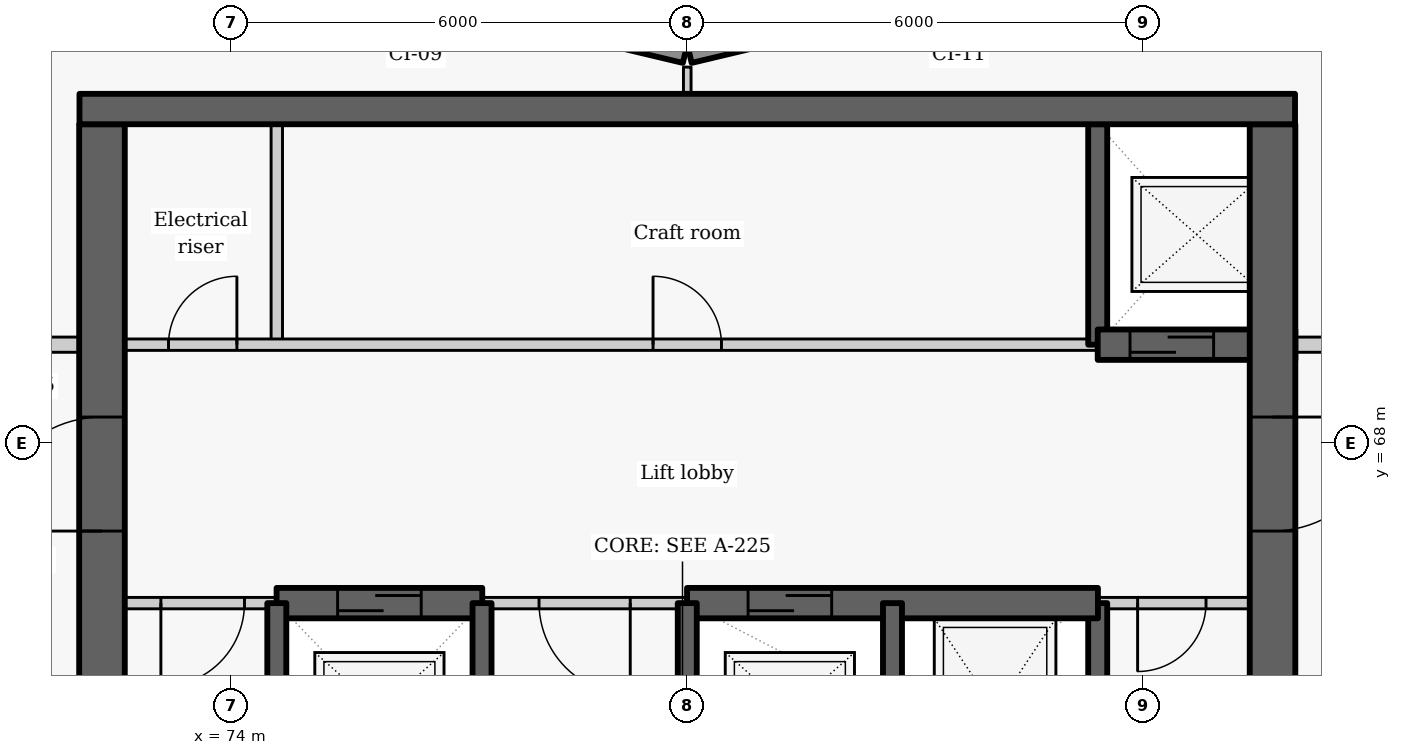
"""IFC4 building model, lengths in metres.
Left out: names, types, materials, properties, quantities, classifications, styles, units other than length and angle.
Written with IfcOpenShell. Run it as: python <this file> out.ifc"""

import sys

from ifc_helpers import new_model, si_unit, direction, frame, frame_2d, origin, place, context, subcontext, project, spatial, rectangle, extrude, element, fill, save


model = new_model("IFC4")
c1 = context("Model", 3, precision=1e-05, world=origin(), true_north=direction((0.0, 1.0)))
c2 = subcontext(c1, "Body", "Model", "MODEL_VIEW")
j1 = project(units=[si_unit("LENGTHUNIT", "METRE"), si_unit("PLANEANGLEUNIT", "RADIAN")], contexts=[c1])
p1 = place(None, origin())
s1 = spatial("IfcSite", under=j1, at=p1, CompositionType="ELEMENT")
p2 = place(p1, origin())
s2 = spatial("IfcBuilding", under=s1, at=p2, CompositionType="ELEMENT")
p3 = place(p2, frame((0.0, 0.0, 130.5)))
s3 = spatial("IfcBuildingStorey", under=s2, at=p3, CompositionType="ELEMENT", Elevation=130.5)
p4 = place(p3, frame((83.186, 73.881, 0.0), z_axis=(0.0, 0.0, 1.0), x_axis=(-0.972773113459, -0.231759508395, 0.0)))
e1 = element("IfcWall", 1, at=p4, inside=s3, PredefinedType="SOLIDWALL", context=c2, shape_type="SweptSolid", body=[
    extrude(rectangle(XDim=3.246, YDim=0.25, at=frame_2d((1.623, 0.0))), origin(), (0.0, 0.0, 1.0), 2.425),
])
p5 = place(p4, frame((0.573, 0.0, 0.9)))
e2 = element("IfcOpeningElement", 2, at=p5, cuts=e1, PredefinedType="OPENING", context=c2, shape_type="SweptSolid", body=[
    extrude(rectangle(XDim=2.1, YDim=1.1, at=frame_2d((1.05, 0.55))), frame((0.0, 0.135, 0.0), z_axis=(0.0, -1.0, 0.0), x_axis=(1.0, 0.0, 0.0)), (0.0, 0.0, 1.0), 0.27),
])
p6 = place(p3, frame((79.971, 73.128, 0.0), z_axis=(0.0, 0.0, 1.0), x_axis=(-0.972773113459, 0.231759508395, 0.0)))
e3 = element("IfcWall", 3, at=p6, inside=s3, PredefinedType="SOLIDWALL", context=c2, shape_type="SweptSolid", body=[
    extrude(rectangle(XDim=3.246, YDim=0.25, at=frame_2d((1.623, 0.0))), origin(), (0.0, 0.0, 1.0), 2.425),
])
p7 = place(p6, frame((0.573, 0.0, 0.9)))
e4 = element("IfcOpeningElement", 4, at=p7, cuts=e3, PredefinedType="OPENING", context=c2, shape_type="SweptSolid", body=[
    extrude(rectangle(XDim=2.1, YDim=1.1, at=frame_2d((1.05, 0.55))), frame((0.0, 0.135, 0.0), z_axis=(0.0, -1.0, 0.0), x_axis=(1.0, 0.0, 0.0)), (0.0, 0.0, 1.0), 0.27),
])
p8 = place(p3, frame((74.6, 69.3, 0.0), z_axis=(0.0, 0.0, 1.0), x_axis=(0.0, 1.0, 0.0)))
e5 = element("IfcWall", 5, at=p8, inside=s3, PredefinedType="PARTITIONING", context=c2, shape_type="SweptSolid", body=[
    extrude(rectangle(XDim=2.9, YDim=0.15, at=frame_2d((1.45, 0.0))), origin(), (0.0, 0.0, 1.0), 3.025),
])
p9 = place(p3, frame((72.0, 69.3, 0.0), z_axis=(0.0, 0.0, 1.0), x_axis=(1.0, 0.0, 0.0)))
e6 = element("IfcWall", 6, at=p9, inside=s3, PredefinedType="PARTITIONING", context=c2, shape_type="SweptSolid", body=[
    extrude(rectangle(XDim=13.4, YDim=0.15, at=frame_2d((6.7, 0.0))), origin(), (0.0, 0.0, 1.0), 3.025),
])
p10 = place(p9, frame((1.175, 0.0, 0.0)))
e7 = element("IfcOpeningElement", 7, at=p10, cuts=e6, PredefinedType="OPENING", context=c2, shape_type="SweptSolid", body=[
    extrude(rectangle(XDim=0.9, YDim=2.1, at=frame_2d((0.45, 1.05))), frame((0.0, 0.085, 0.0), z_axis=(0.0, -1.0, 0.0), x_axis=(1.0, 0.0, 0.0)), (0.0, 0.0, 1.0), 0.17),
])
p11 = place(p9, frame((7.55, 0.0, 0.0)))
e8 = element("IfcOpeningElement", 8, at=p11, cuts=e6, PredefinedType="OPENING", context=c2, shape_type="SweptSolid", body=[
    extrude(rectangle(XDim=0.9, YDim=2.1, at=frame_2d((0.45, 1.05))), frame((0.0, 0.085, 0.0), z_axis=(0.0, -1.0, 0.0), x_axis=(1.0, 0.0, 0.0)), (0.0, 0.0, 1.0), 0.17),
])
p12 = place(p3, frame((72.3, 63.1, -0.275), z_axis=(0.0, 0.0, 1.0), x_axis=(0.0, 1.0, 0.0)))
e9 = element("IfcWall", 9, at=p12, inside=s3, PredefinedType="SHEAR", context=c2, shape_type="SweptSolid", body=[
    extrude(rectangle(XDim=9.1, YDim=0.6, at=frame_2d((4.55, 0.0))), origin(), (0.0, 0.0, 1.0), 3.3),
])
p13 = place(p12, frame((3.748, 0.0, 0.275)))
e10 = element("IfcOpeningElement", 10, at=p13, cuts=e9, PredefinedType="OPENING", context=c2, shape_type="SweptSolid", body=[
    extrude(rectangle(XDim=1.5, YDim=2.1, at=frame_2d((0.75, 1.05))), frame((0.0, 0.31, 0.0), z_axis=(0.0, -1.0, 0.0), x_axis=(1.0, 0.0, 0.0)), (0.0, 0.0, 1.0), 0.62),
])
p14 = place(p3, frame((85.4, 63.1, -0.275), z_axis=(0.0, 0.0, 1.0), x_axis=(0.0, 1.0, 0.0)))
e11 = element("IfcWall", 11, at=p14, inside=s3, PredefinedType="SHEAR", context=c2, shape_type="SweptSolid", body=[
    extrude(rectangle(XDim=2.8, YDim=0.25, at=frame_2d((1.4, 0.0))), origin(), (0.0, 0.0, 1.0), 3.3),
])
p15 = place(p3, frame((85.4, 69.3, -0.275), z_axis=(0.0, 0.0, 1.0), x_axis=(0.0, 1.0, 0.0)))
e12 = element("IfcWall", 12, at=p15, inside=s3, PredefinedType="SHEAR", context=c2, shape_type="SweptSolid", body=[
    extrude(rectangle(XDim=2.9, YDim=0.25, at=frame_2d((1.45, 0.0))), origin(), (0.0, 0.0, 1.0), 3.3),
])
p16 = place(p3, frame((85.4, 69.3, -0.275), z_axis=(0.0, 0.0, 1.0), x_axis=(1.0, 0.0, 0.0)))
e13 = element("IfcWall", 13, at=p16, inside=s3, PredefinedType="SHEAR", context=c2, shape_type="SweptSolid", body=[
    extrude(rectangle(XDim=2.6, YDim=0.4, at=frame_2d((1.3, 0.0))), origin(), (0.0, 0.0, 1.0), 3.3),
])
p17 = place(p16, frame((0.425, 0.0, 0.275)))
e14 = element("IfcOpeningElement", 14, at=p17, cuts=e13, PredefinedType="OPENING", context=c2, shape_type="SweptSolid", body=[
    extrude(rectangle(XDim=1.1, YDim=2.1, at=frame_2d((0.55, 1.05))), frame((0.0, 0.21, 0.0), z_axis=(0.0, -1.0, 0.0), x_axis=(1.0, 0.0, 0.0)), (0.0, 0.0, 1.0), 0.42),
])
p18 = place(p3, frame((87.7, 72.2, -0.275), z_axis=(0.0, 0.0, 1.0), x_axis=(0.0, -1.0, 0.0)))
e15 = element("IfcWall", 15, at=p18, inside=s3, PredefinedType="SHEAR", context=c2, shape_type="SweptSolid", body=[
    extrude(rectangle(XDim=15.6, YDim=0.6, at=frame_2d((7.8, 0.0))), origin(), (0.0, 0.0, 1.0), 3.3),
])
p19 = place(p18, frame((3.852, 0.0, 0.275)))
e16 = element("IfcOpeningElement", 16, at=p19, cuts=e15, PredefinedType="OPENING", context=c2, shape_type="SweptSolid", body=[
    extrude(rectangle(XDim=1.5, YDim=2.1, at=frame_2d((0.75, 1.05))), frame((0.0, 0.31, 0.0), z_axis=(0.0, -1.0, 0.0), x_axis=(1.0, 0.0, 0.0)), (0.0, 0.0, 1.0), 0.62),
])
p20 = place(p3, frame((74.603, 65.9, 0.0), z_axis=(0.0, 0.0, 1.0), x_axis=(-1.0, 0.0, 0.0)))
e17 = element("IfcWall", 17, at=p20, inside=s3, PredefinedType="PARTITIONING", context=c2, shape_type="SweptSolid", body=[
    extrude(rectangle(XDim=2.603, YDim=0.15, at=frame_2d((1.302, 0.0))), origin(), (0.0, 0.0, 1.0), 3.025),
])
p21 = place(p20, frame((0.428, 0.0, 0.0)))
e18 = element("IfcOpeningElement", 18, at=p21, cuts=e17, PredefinedType="OPENING", context=c2, shape_type="SweptSolid", body=[
    extrude(rectangle(XDim=1.1, YDim=2.1, at=frame_2d((0.55, 1.05))), frame((0.0, 0.085, 0.0), z_axis=(0.0, -1.0, 0.0), x_axis=(1.0, 0.0, 0.0)), (0.0, 0.0, 1.0), 0.17),
])
p22 = place(p3, frame((80.003, 65.9, 0.0), z_axis=(0.0, 0.0, 1.0), x_axis=(-1.0, 0.0, 0.0)))
e19 = element("IfcWall", 19, at=p22, inside=s3, PredefinedType="PARTITIONING", context=c2, shape_type="SweptSolid", body=[
    extrude(rectangle(XDim=2.706, YDim=0.15, at=frame_2d((1.353, 0.0))), origin(), (0.0, 0.0, 1.0), 3.025),
])
p23 = place(p22, frame((0.753, 0.0, 0.0)))
e20 = element("IfcOpeningElement", 20, at=p23, cuts=e19, PredefinedType="OPENING", context=c2, shape_type="SweptSolid", body=[
    extrude(rectangle(XDim=1.2, YDim=2.1, at=frame_2d((0.6, 1.05))), frame((0.0, 0.085, 0.0), z_axis=(0.0, -1.0, 0.0), x_axis=(1.0, 0.0, 0.0)), (0.0, 0.0, 1.0), 0.17),
])
p24 = place(p3, frame((88.0, 65.9, 0.0), z_axis=(0.0, 0.0, 1.0), x_axis=(-1.0, 0.0, 0.0)))
e21 = element("IfcWall", 21, at=p24, inside=s3, PredefinedType="PARTITIONING", context=c2, shape_type="SweptSolid", body=[
    extrude(rectangle(XDim=2.603, YDim=0.15, at=frame_2d((1.302, 0.0))), origin(), (0.0, 0.0, 1.0), 3.025),
])
p25 = place(p24, frame((1.175, 0.0, 0.0)))
e22 = element("IfcOpeningElement", 22, at=p25, cuts=e21, PredefinedType="OPENING", context=c2, shape_type="SweptSolid", body=[
    extrude(rectangle(XDim=0.9, YDim=2.1, at=frame_2d((0.45, 1.05))), frame((0.0, 0.085, 0.0), z_axis=(0.0, -1.0, 0.0), x_axis=(1.0, 0.0, 0.0)), (0.0, 0.0, 1.0), 0.17),
])
p26 = place(p3, frame((74.597, 65.9, -0.275), z_axis=(0.0, 0.0, 1.0), x_axis=(1.0, 0.0, 0.0)))
e23 = element("IfcWall", 23, at=p26, inside=s3, PredefinedType="SHEAR", context=c2, shape_type="SweptSolid", body=[
    extrude(rectangle(XDim=2.706, YDim=0.4, at=frame_2d((1.353, 0.0))), origin(), (0.0, 0.0, 1.0), 3.3),
])
p27 = place(p26, frame((0.803, 0.0, 0.275)))
e24 = element("IfcOpeningElement", 24, at=p27, cuts=e23, PredefinedType="OPENING", context=c2, shape_type="SweptSolid", body=[
    extrude(rectangle(XDim=1.1, YDim=2.1, at=frame_2d((0.55, 1.05))), frame((0.0, 0.21, 0.0), z_axis=(0.0, -1.0, 0.0), x_axis=(1.0, 0.0, 0.0)), (0.0, 0.0, 1.0), 0.42),
])
p28 = place(p3, frame((79.997, 65.9, -0.275), z_axis=(0.0, 0.0, 1.0), x_axis=(1.0, 0.0, 0.0)))
e25 = element("IfcWall", 25, at=p28, inside=s3, PredefinedType="SHEAR", context=c2, shape_type="SweptSolid", body=[
    extrude(rectangle(XDim=5.406, YDim=0.4, at=frame_2d((2.703, 0.0))), origin(), (0.0, 0.0, 1.0), 3.3),
])
p29 = place(p28, frame((0.803, 0.0, 0.275)))
e26 = element("IfcOpeningElement", 26, at=p29, cuts=e25, PredefinedType="OPENING", context=c2, shape_type="SweptSolid", body=[
    extrude(rectangle(XDim=1.1, YDim=2.1, at=frame_2d((0.55, 1.05))), frame((0.0, 0.21, 0.0), z_axis=(0.0, -1.0, 0.0), x_axis=(1.0, 0.0, 0.0)), (0.0, 0.0, 1.0), 0.42),
])
for number, where, z_axis, x_axis in (
    (27, (74.6, 63.1, -0.275), (0.0, 0.0, 1.0), (0.0, 1.0, 0.0)),
    (28, (77.3, 63.1, -0.275), (0.0, 0.0, 1.0), (0.0, 1.0, 0.0)),
    (29, (80.0, 63.1, -0.275), (0.0, 0.0, 1.0), (0.0, 1.0, 0.0)),
    (30, (82.7, 63.1, -0.275), (0.0, 0.0, 1.0), (0.0, 1.0, 0.0)),
):
    element("IfcWall", number, at=place(p3, frame(where, z_axis=z_axis, x_axis=x_axis)), inside=s3, PredefinedType="SHEAR", context=c2, shape_type="SweptSolid", body=[
        extrude(rectangle(XDim=2.8, YDim=0.25, at=frame_2d((1.4, 0.0))), origin(), (0.0, 0.0, 1.0), 3.3),
    ])
for number, where, z_axis, x_axis in (
    (31, (70.45, 69.3, 0.0), (0.0, 0.0, 1.0), (1.0, 0.0, 0.0)),
    (32, (88.0, 69.3, 0.0), (0.0, 0.0, 1.0), (1.0, 0.0, 0.0)),
):
    element("IfcWall", number, at=place(p3, frame(where, z_axis=z_axis, x_axis=x_axis)), inside=s3, PredefinedType="PARTITIONING", context=c2, shape_type="SweptSolid", body=[
        extrude(rectangle(XDim=1.55, YDim=0.2, at=frame_2d((0.775, 0.0))), origin(), (0.0, 0.0, 1.0), 3.025),
    ])
p30 = place(p3, frame((80.0, 72.6, 0.0), z_axis=(0.0, 0.0, 1.0), x_axis=(0.0, 1.0, 0.0)))
e33 = element("IfcWall", 33, at=p30, inside=s3, PredefinedType="PARTITIONING", context=c2, shape_type="SweptSolid", body=[
    extrude(rectangle(XDim=0.352, YDim=0.1, at=frame_2d((0.176, 0.0))), origin(), (0.0, 0.0, 1.0), 3.025),
])
p31 = place(p3, frame((72.004, 72.4, -0.275), z_axis=(0.0, 0.0, 1.0), x_axis=(1.0, 0.0, 0.0)))
e34 = element("IfcWall", 34, at=p31, inside=s3, PredefinedType="SHEAR", context=c2, shape_type="SweptSolid", body=[
    extrude(rectangle(XDim=15.992, YDim=0.4, at=frame_2d((7.996, 0.0))), origin(), (0.0, 0.0, 1.0), 3.3),
])
p32 = place(p10, origin())
e35 = element("IfcDoor", 35, at=p32, inside=s3, OperationType="SINGLE_SWING_RIGHT", PredefinedType="DOOR", context=c2, shape_type="SweptSolid", body=[
    extrude(rectangle(XDim=0.9, YDim=2.1, at=frame_2d((0.45, 1.05))), frame((0.0, 0.025, 0.0), z_axis=(0.0, -1.0, 0.0), x_axis=(1.0, 0.0, 0.0)), (0.0, 0.0, 1.0), 0.05),
])
fill(e7, e35)
p33 = place(p17, origin())
e36 = element("IfcDoor", 36, at=p33, inside=s3, OperationType="SLIDING_TO_LEFT", PredefinedType="DOOR", context=c2, shape_type="SweptSolid", body=[
    extrude(rectangle(XDim=1.1, YDim=2.1, at=frame_2d((0.55, 1.05))), frame((0.0, 0.025, 0.0), z_axis=(0.0, -1.0, 0.0), x_axis=(1.0, 0.0, 0.0)), (0.0, 0.0, 1.0), 0.05),
])
fill(e14, e36)
p34 = place(p11, origin())
e37 = element("IfcDoor", 37, at=p34, inside=s3, OperationType="SINGLE_SWING_LEFT", PredefinedType="DOOR", context=c2, shape_type="SweptSolid", body=[
    extrude(rectangle(XDim=0.9, YDim=2.1, at=frame_2d((0.45, 1.05))), frame((0.0, 0.025, 0.0), z_axis=(0.0, -1.0, 0.0), x_axis=(1.0, 0.0, 0.0)), (0.0, 0.0, 1.0), 0.05),
])
fill(e8, e37)
p35 = place(p21, origin())
e38 = element("IfcDoor", 38, at=p35, inside=s3, OperationType="SINGLE_SWING_RIGHT", PredefinedType="DOOR", context=c2, shape_type="SweptSolid", body=[
    extrude(rectangle(XDim=1.1, YDim=2.1, at=frame_2d((0.55, 1.05))), frame((0.0, 0.025, 0.0), z_axis=(0.0, -1.0, 0.0), x_axis=(1.0, 0.0, 0.0)), (0.0, 0.0, 1.0), 0.05),
])
fill(e18, e38)
p36 = place(p27, origin())
e39 = element("IfcDoor", 39, at=p36, inside=s3, OperationType="SLIDING_TO_LEFT", PredefinedType="DOOR", context=c2, shape_type="SweptSolid", body=[
    extrude(rectangle(XDim=1.1, YDim=2.1, at=frame_2d((0.55, 1.05))), frame((0.0, 0.025, 0.0), z_axis=(0.0, -1.0, 0.0), x_axis=(1.0, 0.0, 0.0)), (0.0, 0.0, 1.0), 0.05),
])
fill(e24, e39)
p37 = place(p23, origin())
e40 = element("IfcDoor", 40, at=p37, inside=s3, OperationType="DOUBLE_DOOR_SINGLE_SWING", PredefinedType="DOOR", context=c2, shape_type="SweptSolid", body=[
    extrude(rectangle(XDim=1.2, YDim=2.1, at=frame_2d((0.6, 1.05))), frame((0.0, 0.025, 0.0), z_axis=(0.0, -1.0, 0.0), x_axis=(1.0, 0.0, 0.0)), (0.0, 0.0, 1.0), 0.05),
])
fill(e20, e40)
p38 = place(p29, origin())
e41 = element("IfcDoor", 41, at=p38, inside=s3, OperationType="SLIDING_TO_LEFT", PredefinedType="DOOR", context=c2, shape_type="SweptSolid", body=[
    extrude(rectangle(XDim=1.1, YDim=2.1, at=frame_2d((0.55, 1.05))), frame((0.0, 0.025, 0.0), z_axis=(0.0, -1.0, 0.0), x_axis=(1.0, 0.0, 0.0)), (0.0, 0.0, 1.0), 0.05),
])
fill(e26, e41)
p39 = place(p25, origin())
e42 = element("IfcDoor", 42, at=p39, inside=s3, OperationType="SINGLE_SWING_RIGHT", PredefinedType="DOOR", context=c2, shape_type="SweptSolid", body=[
    extrude(rectangle(XDim=0.9, YDim=2.1, at=frame_2d((0.45, 1.05))), frame((0.0, 0.025, 0.0), z_axis=(0.0, -1.0, 0.0), x_axis=(1.0, 0.0, 0.0)), (0.0, 0.0, 1.0), 0.05),
])
fill(e22, e42)
p40 = place(p19, origin())
e43 = element("IfcDoor", 43, at=p40, inside=s3, OperationType="DOUBLE_DOOR_SINGLE_SWING", PredefinedType="DOOR", context=c2, shape_type="SweptSolid", body=[
    extrude(rectangle(XDim=1.5, YDim=2.1, at=frame_2d((0.75, 1.05))), frame((0.0, 0.025, 0.0), z_axis=(0.0, -1.0, 0.0), x_axis=(1.0, 0.0, 0.0)), (0.0, 0.0, 1.0), 0.05),
])
fill(e16, e43)
p41 = place(p13, origin())
e44 = element("IfcDoor", 44, at=p41, inside=s3, OperationType="DOUBLE_DOOR_SINGLE_SWING", PredefinedType="DOOR", context=c2, shape_type="SweptSolid", body=[
    extrude(rectangle(XDim=1.5, YDim=2.1, at=frame_2d((0.75, 1.05))), frame((0.0, 0.025, 0.0), z_axis=(0.0, -1.0, 0.0), x_axis=(1.0, 0.0, 0.0)), (0.0, 0.0, 1.0), 0.05),
])
fill(e10, e44)
save(model, sys.argv[1])
